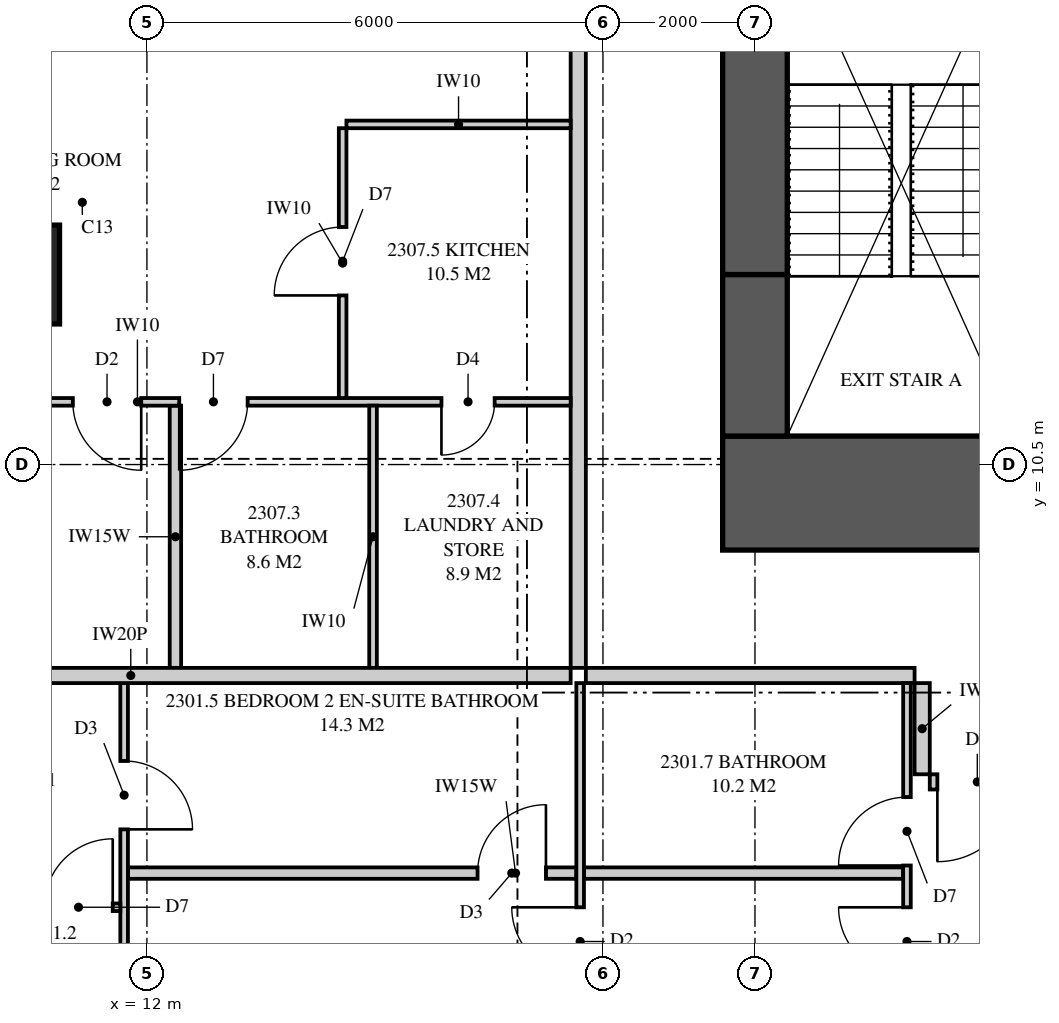
"""IFC4 building model, lengths in metres.
Left out: names, types, materials, properties, quantities, classifications, styles, units other than length and angle.
Written with IfcOpenShell. Run it as: python <this file> out.ifc"""

import sys

from ifc_helpers import new_model, si_unit, direction, frame, frame_2d, origin, origin_2d, place, context, subcontext, project, spatial, polyline, rectangle, outline, extrude, element, fill, save


model = new_model("IFC4")
c1 = context("Model", 3, precision=1e-05, world=origin(), true_north=direction((0.0, 1.0)))
c2 = subcontext(c1, "Body", "Model", "MODEL_VIEW")
j1 = project(units=[si_unit("LENGTHUNIT", "METRE"), si_unit("PLANEANGLEUNIT", "RADIAN")], contexts=[c1])
p1 = place(None, origin())
s1 = spatial("IfcSite", under=j1, at=p1, CompositionType="ELEMENT")
p2 = place(p1, origin())
s2 = spatial("IfcBuilding", under=s1, at=p2, CompositionType="ELEMENT")
p3 = place(p2, frame((0.0, 0.0, 88.1)))
s3 = spatial("IfcBuildingStorey", under=s2, at=p3, CompositionType="ELEMENT", Elevation=88.1)
p4 = place(p3, frame((10.2, 13.0, 0.0), z_axis=(0.0, 0.0, 1.0), x_axis=(1.0, 0.0, 0.0)))
e1 = element("IfcColumn", 1, at=p4, inside=s3, PredefinedType="COLUMN", context=c2, shape_type="SweptSolid", body=[
    extrude(rectangle(XDim=1.3, YDim=1.3, at=origin_2d()), origin(), (0.0, 0.0, 1.0), 3.35),
])
p5 = place(p3, frame((19.575, 10.125, 0.0), z_axis=(0.0, 0.0, 1.0), x_axis=(1.0, 0.0, 0.0)))
e2 = element("IfcWall", 2, at=p5, inside=s3, PredefinedType="SHEAR", context=c2, shape_type="SweptSolid", body=[
    extrude(rectangle(XDim=6.425, YDim=1.5, at=frame_2d((3.212, 0.0))), origin(), (0.0, 0.0, 1.0), 3.35),
])
p6 = place(p5, frame((4.85, 0.0, 0.0)))
e3 = element("IfcOpeningElement", 3, at=p6, cuts=e2, PredefinedType="OPENING", context=c2, shape_type="SweptSolid", body=[
    extrude(rectangle(XDim=0.75, YDim=2.1, at=frame_2d((0.375, 1.05))), frame((0.0, 0.76, 0.0), z_axis=(0.0, -1.0, 0.0), x_axis=(1.0, 0.0, 0.0)), (0.0, 0.0, 1.0), 1.52),
])
p7 = place(p3, frame((20.0, 17.7, 0.0), z_axis=(0.0, 0.0, 1.0), x_axis=(0.0, -1.0, 0.0)))
e4 = element("IfcWall", 4, at=p7, inside=s3, PredefinedType="SHEAR", context=c2, shape_type="SweptSolid", body=[
    extrude(rectangle(XDim=4.7, YDim=0.85, at=frame_2d((2.35, 0.0))), origin(), (0.0, 0.0, 1.0), 3.35),
])
p8 = place(p3, frame((20.0, 13.0, 0.0), z_axis=(0.0, 0.0, 1.0), x_axis=(0.0, -1.0, 0.0)))
e5 = element("IfcWall", 5, at=p8, inside=s3, PredefinedType="SHEAR", context=c2, shape_type="SweptSolid", body=[
    extrude(rectangle(XDim=2.125, YDim=0.85, at=frame_2d((1.062, 0.0))), origin(), (0.0, 0.0, 1.0), 3.35),
])
p9 = place(p3, frame((17.775, 7.725, 0.0), z_axis=(0.0, 0.0, 1.0), x_axis=(1.0, 0.0, 0.0)))
e6 = element("IfcWall", 6, at=p9, inside=s3, PredefinedType="PARTITIONING", context=c2, shape_type="SweptSolid", body=[
    extrude(rectangle(XDim=4.325, YDim=0.2, at=frame_2d((2.163, 0.0))), origin(), (0.0, 0.0, 1.0), 3.11),
])
p10 = place(p3, frame((11.7, 0.175, 0.0), z_axis=(0.0, 0.0, 1.0), x_axis=(0.0, 1.0, 0.0)))
e7 = element("IfcWall", 7, at=p10, inside=s3, PredefinedType="PARTITIONING", context=c2, shape_type="SweptSolid", body=[
    extrude(outline(polyline([(0.0, 0.0), (7.45, 0.0), (7.45, 3.11), (2.708, 3.11), (2.708, 2.15), (0.953, 2.15), (0.953, 3.11), (0.0, 3.11), (0.0, 0.0)])), frame((0.0, 0.05, 0.0), z_axis=(0.0, -1.0, 0.0), x_axis=(1.0, 0.0, 0.0)), (0.0, 0.0, 1.0), 0.1),
])
p11 = place(p10, frame((2.701, 0.0, 0.0)))
e8 = element("IfcOpeningElement", 8, at=p11, cuts=e7, PredefinedType="OPENING", context=c2, shape_type="SweptSolid", body=[
    extrude(rectangle(XDim=0.9, YDim=2.1, at=frame_2d((0.45, 1.05))), frame((0.0, 0.06, 0.0), z_axis=(0.0, -1.0, 0.0), x_axis=(1.0, 0.0, 0.0)), (0.0, 0.0, 1.0), 0.12),
])
p12 = place(p10, frame((5.525, 0.0, 0.0)))
e9 = element("IfcOpeningElement", 9, at=p12, cuts=e7, PredefinedType="OPENING", context=c2, shape_type="SweptSolid", body=[
    extrude(rectangle(XDim=0.9, YDim=2.1, at=frame_2d((0.45, 1.05))), frame((0.0, 0.06, 0.0), z_axis=(0.0, -1.0, 0.0), x_axis=(1.0, 0.0, 0.0)), (0.0, 0.0, 1.0), 0.12),
])
p13 = place(p3, frame((17.7, 0.175, 0.0), z_axis=(0.0, 0.0, 1.0), x_axis=(0.0, 1.0, 0.0)))
e10 = element("IfcWall", 10, at=p13, inside=s3, PredefinedType="PARTITIONING", context=c2, shape_type="SweptSolid", body=[
    extrude(outline(polyline([(1.635, 2.15), (0.0, 2.15), (0.0, 0.0), (7.45, 0.0), (7.45, 3.11), (1.635, 3.11), (1.635, 2.15)]), holes=[polyline([(1.024, 0.104), (0.526, 0.104), (0.526, 0.918), (1.024, 0.918), (1.024, 0.104)]), polyline([(1.024, 1.232), (0.526, 1.232), (0.526, 2.046), (1.024, 2.046), (1.024, 1.232)])]), frame((0.0, 0.05, 0.0), z_axis=(0.0, -1.0, 0.0), x_axis=(1.0, 0.0, 0.0)), (0.0, 0.0, 1.0), 0.1),
])
p14 = place(p13, frame((3.6, 0.0, 0.0)))
e11 = element("IfcOpeningElement", 11, at=p14, cuts=e10, PredefinedType="OPENING", context=c2, shape_type="SweptSolid", body=[
    extrude(rectangle(XDim=0.9, YDim=2.1, at=frame_2d((0.45, 1.05))), frame((0.0, 0.06, 0.0), z_axis=(0.0, -1.0, 0.0), x_axis=(1.0, 0.0, 0.0)), (0.0, 0.0, 1.0), 0.12),
])
p15 = place(p3, frame((22.0, 0.175, 0.0), z_axis=(0.0, 0.0, 1.0), x_axis=(0.0, 1.0, 0.0)))
e12 = element("IfcWall", 12, at=p15, inside=s3, PredefinedType="PARTITIONING", context=c2, shape_type="SweptSolid", body=[
    extrude(outline(polyline([(0.0, 0.0), (7.45, 0.0), (7.45, 3.11), (1.635, 3.11), (1.635, 2.15), (0.0, 2.15), (0.0, 3.11), (0.0, 0.0)])), frame((0.0, 0.05, 0.0), z_axis=(0.0, -1.0, 0.0), x_axis=(1.0, 0.0, 0.0)), (0.0, 0.0, 1.0), 0.1),
])
p16 = place(p15, frame((3.6, 0.0, 0.0)))
e13 = element("IfcOpeningElement", 13, at=p16, cuts=e12, PredefinedType="OPENING", context=c2, shape_type="SweptSolid", body=[
    extrude(rectangle(XDim=0.9, YDim=2.1, at=frame_2d((0.45, 1.05))), frame((0.0, 0.06, 0.0), z_axis=(0.0, -1.0, 0.0), x_axis=(1.0, 0.0, 0.0)), (0.0, 0.0, 1.0), 0.12),
])
p17 = place(p15, frame((5.05, 0.0, 0.0)))
e14 = element("IfcOpeningElement", 14, at=p17, cuts=e12, PredefinedType="OPENING", context=c2, shape_type="SweptSolid", body=[
    extrude(rectangle(XDim=0.9, YDim=2.1, at=frame_2d((0.45, 1.05))), frame((0.0, 0.06, 0.0), z_axis=(0.0, -1.0, 0.0), x_axis=(1.0, 0.0, 0.0)), (0.0, 0.0, 1.0), 0.12),
])
p18 = place(p3, frame((6.0, 4.676, 0.0), z_axis=(0.0, 0.0, 1.0), x_axis=(1.0, 0.0, 0.0)))
e15 = element("IfcWall", 15, at=p18, inside=s3, PredefinedType="PARTITIONING", context=c2, shape_type="SweptSolid", body=[
    extrude(outline(polyline([(0.0, 0.0), (5.65, 0.0), (5.65, 3.11), (5.46, 3.11), (5.46, 2.51), (3.171, 2.51), (3.171, 2.15), (1.429, 2.15), (1.429, 3.11), (0.0, 3.11), (0.0, 0.0)])), frame((0.0, 0.05, 0.0), z_axis=(0.0, -1.0, 0.0), x_axis=(1.0, 0.0, 0.0)), (0.0, 0.0, 1.0), 0.1),
])
p19 = place(p18, frame((4.65, 0.0, 0.0)))
e16 = element("IfcOpeningElement", 16, at=p19, cuts=e15, PredefinedType="OPENING", context=c2, shape_type="SweptSolid", body=[
    extrude(rectangle(XDim=0.9, YDim=2.1, at=frame_2d((0.45, 1.05))), frame((0.0, 0.06, 0.0), z_axis=(0.0, -1.0, 0.0), x_axis=(1.0, 0.0, 0.0)), (0.0, 0.0, 1.0), 0.12),
])
p20 = place(p3, frame((11.75, 5.125, 0.0), z_axis=(0.0, 0.0, 1.0), x_axis=(1.0, 0.0, 0.0)))
e17 = element("IfcWall", 17, at=p20, inside=s3, PredefinedType="PLUMBINGWALL", context=c2, shape_type="SweptSolid", body=[
    extrude(outline(polyline([(0.0, 0.0), (5.9, 0.0), (5.9, 3.11), (5.446, 3.11), (5.446, 2.531), (4.804, 2.531), (4.804, 3.11), (0.0, 3.11), (0.0, 0.0)])), frame((0.0, 0.075, 0.0), z_axis=(0.0, -1.0, 0.0), x_axis=(1.0, 0.0, 0.0)), (0.0, 0.0, 1.0), 0.15),
])
p21 = place(p20, frame((4.6, 0.0, 0.0)))
e18 = element("IfcOpeningElement", 18, at=p21, cuts=e17, PredefinedType="OPENING", context=c2, shape_type="SweptSolid", body=[
    extrude(rectangle(XDim=0.9, YDim=2.1, at=frame_2d((0.45, 1.05))), frame((0.0, 0.085, 0.0), z_axis=(0.0, -1.0, 0.0), x_axis=(1.0, 0.0, 0.0)), (0.0, 0.0, 1.0), 0.17),
])
p22 = place(p3, frame((17.75, 5.125, 0.0), z_axis=(0.0, 0.0, 1.0), x_axis=(1.0, 0.0, 0.0)))
e19 = element("IfcWall", 19, at=p22, inside=s3, PredefinedType="PLUMBINGWALL", context=c2, shape_type="SweptSolid", body=[
    extrude(rectangle(XDim=4.2, YDim=0.15, at=frame_2d((2.1, 0.0))), origin(), (0.0, 0.0, 1.0), 3.11),
])
p23 = place(p3, frame((6.0, 7.725, 0.0), z_axis=(0.0, 0.0, 1.0), x_axis=(1.0, 0.0, 0.0)))
e20 = element("IfcWall", 20, at=p23, inside=s3, PredefinedType="PARTITIONING", context=c2, shape_type="SweptSolid", body=[
    extrude(outline(polyline([(0.0, 0.0), (11.575, 0.0), (11.575, 3.11), (11.221, 3.11), (11.221, 2.531), (10.529, 2.531), (10.529, 3.11), (5.51, 3.11), (5.51, 2.51), (2.978, 2.51), (2.978, 2.531), (2.727, 2.531), (2.727, 2.15), (0.884, 2.15), (0.884, 3.11), (0.0, 3.11), (0.0, 0.0)])), frame((0.0, 0.1, 0.0), z_axis=(0.0, -1.0, 0.0), x_axis=(1.0, 0.0, 0.0)), (0.0, 0.0, 1.0), 0.2),
])
p24 = place(p3, frame((17.675, 7.825, 0.0), z_axis=(0.0, 0.0, 1.0), x_axis=(0.0, 1.0, 0.0)))
e21 = element("IfcWall", 21, at=p24, inside=s3, PredefinedType="PARTITIONING", context=c2, shape_type="SweptSolid", body=[
    extrude(outline(polyline([(0.0, 0.0), (9.075, 0.0), (9.075, 3.11), (3.096, 3.11), (3.096, 2.531), (2.404, 2.531), (2.404, 3.11), (0.0, 3.11), (0.0, 0.0)])), frame((0.0, 0.1, 0.0), z_axis=(0.0, -1.0, 0.0), x_axis=(1.0, 0.0, 0.0)), (0.0, 0.0, 1.0), 0.2),
])
p25 = place(p3, frame((6.175, 11.325, 0.0), z_axis=(0.0, 0.0, 1.0), x_axis=(1.0, 0.0, 0.0)))
e22 = element("IfcWall", 22, at=p25, inside=s3, PredefinedType="PARTITIONING", context=c2, shape_type="SweptSolid", body=[
    extrude(outline(polyline([(0.175, 3.11), (0.0, 3.11), (0.0, 0.0), (0.526, 0.0), (0.526, 0.337), (1.024, 0.337), (1.024, 0.0), (11.4, 0.0), (11.4, 3.11), (5.285, 3.11), (5.285, 2.51), (2.765, 2.51), (2.765, 3.11), (2.753, 3.11), (2.753, 2.531), (2.16, 2.531), (2.16, 3.11), (1.918, 3.11), (1.918, 2.15), (1.024, 2.15), (1.024, 1.813), (0.526, 1.813), (0.526, 2.15), (0.175, 2.15), (0.175, 3.11)])), frame((0.0, 0.05, 0.0), z_axis=(0.0, -1.0, 0.0), x_axis=(1.0, 0.0, 0.0)), (0.0, 0.0, 1.0), 0.1),
])
p26 = place(p25, frame((4.85, 0.0, 0.0)))
e23 = element("IfcOpeningElement", 23, at=p26, cuts=e22, PredefinedType="OPENING", context=c2, shape_type="SweptSolid", body=[
    extrude(rectangle(XDim=0.9, YDim=2.1, at=frame_2d((0.45, 1.05))), frame((0.0, 0.06, 0.0), z_axis=(0.0, -1.0, 0.0), x_axis=(1.0, 0.0, 0.0)), (0.0, 0.0, 1.0), 0.12),
])
p27 = place(p25, frame((6.25, 0.0, 0.0)))
e24 = element("IfcOpeningElement", 24, at=p27, cuts=e22, PredefinedType="OPENING", context=c2, shape_type="SweptSolid", body=[
    extrude(rectangle(XDim=0.9, YDim=2.1, at=frame_2d((0.45, 1.05))), frame((0.0, 0.06, 0.0), z_axis=(0.0, -1.0, 0.0), x_axis=(1.0, 0.0, 0.0)), (0.0, 0.0, 1.0), 0.12),
])
p28 = place(p25, frame((9.7, 0.0, 0.0)))
e25 = element("IfcOpeningElement", 25, at=p28, cuts=e22, PredefinedType="OPENING", context=c2, shape_type="SweptSolid", body=[
    extrude(rectangle(XDim=0.7, YDim=2.1, at=frame_2d((0.35, 1.05))), frame((0.0, 0.06, 0.0), z_axis=(0.0, -1.0, 0.0), x_axis=(1.0, 0.0, 0.0)), (0.0, 0.0, 1.0), 0.12),
])
p29 = place(p3, frame((12.375, 7.825, 0.0), z_axis=(0.0, 0.0, 1.0), x_axis=(0.0, 1.0, 0.0)))
e26 = element("IfcWall", 26, at=p29, inside=s3, PredefinedType="PLUMBINGWALL", context=c2, shape_type="SweptSolid", body=[
    extrude(outline(polyline([(0.0, 0.0), (3.45, 0.0), (3.45, 3.11), (3.071, 3.11), (3.071, 2.531), (2.429, 2.531), (2.429, 3.11), (0.0, 3.11), (0.0, 0.0)])), frame((0.0, 0.075, 0.0), z_axis=(0.0, -1.0, 0.0), x_axis=(1.0, 0.0, 0.0)), (0.0, 0.0, 1.0), 0.15),
])
p30 = place(p3, frame((14.975, 7.825, 0.0), z_axis=(0.0, 0.0, 1.0), x_axis=(0.0, 1.0, 0.0)))
e27 = element("IfcWall", 27, at=p30, inside=s3, PredefinedType="PARTITIONING", context=c2, shape_type="SweptSolid", body=[
    extrude(outline(polyline([(0.0, 0.0), (3.45, 0.0), (3.45, 3.11), (3.046, 3.11), (3.046, 2.531), (2.454, 2.531), (2.454, 3.11), (0.0, 3.11), (0.0, 0.0)])), frame((0.0, 0.05, 0.0), z_axis=(0.0, -1.0, 0.0), x_axis=(1.0, 0.0, 0.0)), (0.0, 0.0, 1.0), 0.1),
])
p31 = place(p3, frame((14.575, 11.375, 0.0), z_axis=(0.0, 0.0, 1.0), x_axis=(0.0, 1.0, 0.0)))
e28 = element("IfcWall", 28, at=p31, inside=s3, PredefinedType="PARTITIONING", context=c2, shape_type="SweptSolid", body=[
    extrude(rectangle(XDim=3.55, YDim=0.1, at=frame_2d((1.775, 0.0))), origin(), (0.0, 0.0, 1.0), 3.11),
])
p32 = place(p31, frame((1.35, 0.0, 0.0)))
e29 = element("IfcOpeningElement", 29, at=p32, cuts=e28, PredefinedType="OPENING", context=c2, shape_type="SweptSolid", body=[
    extrude(rectangle(XDim=0.9, YDim=2.1, at=frame_2d((0.45, 1.05))), frame((0.0, 0.06, 0.0), z_axis=(0.0, -1.0, 0.0), x_axis=(1.0, 0.0, 0.0)), (0.0, 0.0, 1.0), 0.12),
])
p33 = place(p3, frame((14.625, 14.975, 0.0), z_axis=(0.0, 0.0, 1.0), x_axis=(1.0, 0.0, 0.0)))
e30 = element("IfcWall", 30, at=p33, inside=s3, PredefinedType="PARTITIONING", context=c2, shape_type="SweptSolid", body=[
    extrude(rectangle(XDim=2.95, YDim=0.1, at=frame_2d((1.475, 0.0))), origin(), (0.0, 0.0, 1.0), 3.11),
])
p34 = place(p3, frame((22.3, 6.325, 0.0), z_axis=(0.0, 0.0, 1.0), x_axis=(1.0, 0.0, 0.0)))
e31 = element("IfcWall", 31, at=p34, inside=s3, PredefinedType="PARTITIONING", context=c2, shape_type="SweptSolid", body=[
    extrude(rectangle(XDim=2.4, YDim=0.2, at=frame_2d((1.2, 0.0))), origin(), (0.0, 0.0, 1.0), 3.11),
])
p35 = place(p34, frame((0.1, 0.0, 0.0)))
e32 = element("IfcOpeningElement", 32, at=p35, cuts=e31, PredefinedType="OPENING", context=c2, shape_type="SweptSolid", body=[
    extrude(rectangle(XDim=1.05, YDim=2.2, at=frame_2d((0.525, 1.1))), frame((0.0, 0.11, 0.0), z_axis=(0.0, -1.0, 0.0), x_axis=(1.0, 0.0, 0.0)), (0.0, 0.0, 1.0), 0.22),
])
p36 = place(p3, frame((22.2, 7.625, 0.0), z_axis=(0.0, 0.0, 1.0), x_axis=(0.0, -1.0, 0.0)))
e33 = element("IfcWall", 33, at=p36, inside=s3, PredefinedType="PARTITIONING", context=c2, shape_type="SweptSolid", body=[
    extrude(rectangle(XDim=1.2, YDim=0.2, at=frame_2d((0.6, 0.0))), origin(), (0.0, 0.0, 1.0), 3.11),
])
p37 = place(p35, frame((1.05, 0.0, 0.0), z_axis=(0.0, 0.0, 1.0), x_axis=(-1.0, 0.0, 0.0)))
e34 = element("IfcDoor", 34, at=p37, inside=s3, OperationType="SINGLE_SWING_RIGHT", PredefinedType="DOOR", context=c2, shape_type="SweptSolid", body=[
    extrude(rectangle(XDim=1.05, YDim=2.2, at=frame_2d((0.525, 1.1))), frame((0.0, 0.025, 0.0), z_axis=(0.0, -1.0, 0.0), x_axis=(1.0, 0.0, 0.0)), (0.0, 0.0, 1.0), 0.05),
])
fill(e32, e34)
p38 = place(p19, origin())
e35 = element("IfcDoor", 35, at=p38, inside=s3, OperationType="SINGLE_SWING_RIGHT", PredefinedType="DOOR", context=c2, shape_type="SweptSolid", body=[
    extrude(rectangle(XDim=0.9, YDim=2.1, at=frame_2d((0.45, 1.05))), frame((0.0, 0.025, 0.0), z_axis=(0.0, -1.0, 0.0), x_axis=(1.0, 0.0, 0.0)), (0.0, 0.0, 1.0), 0.05),
])
fill(e16, e35)
p39 = place(p14, origin())
e36 = element("IfcDoor", 36, at=p39, inside=s3, OperationType="SINGLE_SWING_RIGHT", PredefinedType="DOOR", context=c2, shape_type="SweptSolid", body=[
    extrude(rectangle(XDim=0.9, YDim=2.1, at=frame_2d((0.45, 1.05))), frame((0.0, 0.025, 0.0), z_axis=(0.0, -1.0, 0.0), x_axis=(1.0, 0.0, 0.0)), (0.0, 0.0, 1.0), 0.05),
])
fill(e11, e36)
p40 = place(p21, origin())
e37 = element("IfcDoor", 37, at=p40, inside=s3, OperationType="SINGLE_SWING_RIGHT", PredefinedType="DOOR", context=c2, shape_type="SweptSolid", body=[
    extrude(rectangle(XDim=0.9, YDim=2.1, at=frame_2d((0.45, 1.05))), frame((0.0, 0.025, 0.0), z_axis=(0.0, -1.0, 0.0), x_axis=(1.0, 0.0, 0.0)), (0.0, 0.0, 1.0), 0.05),
])
fill(e18, e37)
p41 = place(p16, origin())
e38 = element("IfcDoor", 38, at=p41, inside=s3, OperationType="SINGLE_SWING_RIGHT", PredefinedType="DOOR", context=c2, shape_type="SweptSolid", body=[
    extrude(rectangle(XDim=0.9, YDim=2.1, at=frame_2d((0.45, 1.05))), frame((0.0, 0.025, 0.0), z_axis=(0.0, -1.0, 0.0), x_axis=(1.0, 0.0, 0.0)), (0.0, 0.0, 1.0), 0.05),
])
fill(e13, e38)
p42 = place(p17, origin())
e39 = element("IfcDoor", 39, at=p42, inside=s3, OperationType="SINGLE_SWING_LEFT", PredefinedType="DOOR", context=c2, shape_type="SweptSolid", body=[
    extrude(rectangle(XDim=0.9, YDim=2.1, at=frame_2d((0.45, 1.05))), frame((0.0, 0.025, 0.0), z_axis=(0.0, -1.0, 0.0), x_axis=(1.0, 0.0, 0.0)), (0.0, 0.0, 1.0), 0.05),
])
fill(e14, e39)
p43 = place(p12, frame((0.9, 0.0, 0.0), z_axis=(0.0, 0.0, 1.0), x_axis=(-1.0, 0.0, 0.0)))
e40 = element("IfcDoor", 40, at=p43, inside=s3, OperationType="SINGLE_SWING_RIGHT", PredefinedType="DOOR", context=c2, shape_type="SweptSolid", body=[
    extrude(rectangle(XDim=0.9, YDim=2.1, at=frame_2d((0.45, 1.05))), frame((0.0, 0.025, 0.0), z_axis=(0.0, -1.0, 0.0), x_axis=(1.0, 0.0, 0.0)), (0.0, 0.0, 1.0), 0.05),
])
fill(e9, e40)
p44 = place(p26, frame((0.9, 0.0, 0.0), z_axis=(0.0, 0.0, 1.0), x_axis=(-1.0, 0.0, 0.0)))
e41 = element("IfcDoor", 41, at=p44, inside=s3, OperationType="SINGLE_SWING_LEFT", PredefinedType="DOOR", context=c2, shape_type="SweptSolid", body=[
    extrude(rectangle(XDim=0.9, YDim=2.1, at=frame_2d((0.45, 1.05))), frame((0.0, 0.025, 0.0), z_axis=(0.0, -1.0, 0.0), x_axis=(1.0, 0.0, 0.0)), (0.0, 0.0, 1.0), 0.05),
])
fill(e23, e41)
p45 = place(p27, frame((0.9, 0.0, 0.0), z_axis=(0.0, 0.0, 1.0), x_axis=(-1.0, 0.0, 0.0)))
e42 = element("IfcDoor", 42, at=p45, inside=s3, OperationType="SINGLE_SWING_RIGHT", PredefinedType="DOOR", context=c2, shape_type="SweptSolid", body=[
    extrude(rectangle(XDim=0.9, YDim=2.1, at=frame_2d((0.45, 1.05))), frame((0.0, 0.025, 0.0), z_axis=(0.0, -1.0, 0.0), x_axis=(1.0, 0.0, 0.0)), (0.0, 0.0, 1.0), 0.05),
])
fill(e24, e42)
p46 = place(p28, frame((0.7, 0.0, 0.0), z_axis=(0.0, 0.0, 1.0), x_axis=(-1.0, 0.0, 0.0)))
e43 = element("IfcDoor", 43, at=p46, inside=s3, OperationType="SINGLE_SWING_RIGHT", PredefinedType="DOOR", context=c2, shape_type="SweptSolid", body=[
    extrude(rectangle(XDim=0.7, YDim=2.1, at=frame_2d((0.35, 1.05))), frame((0.0, 0.025, 0.0), z_axis=(0.0, -1.0, 0.0), x_axis=(1.0, 0.0, 0.0)), (0.0, 0.0, 1.0), 0.05),
])
fill(e25, e43)
p47 = place(p32, origin())
e44 = element("IfcDoor", 44, at=p47, inside=s3, OperationType="SINGLE_SWING_LEFT", PredefinedType="DOOR", context=c2, shape_type="SweptSolid", body=[
    extrude(rectangle(XDim=0.9, YDim=2.1, at=frame_2d((0.45, 1.05))), frame((0.0, 0.025, 0.0), z_axis=(0.0, -1.0, 0.0), x_axis=(1.0, 0.0, 0.0)), (0.0, 0.0, 1.0), 0.05),
])
fill(e29, e44)
save(model, sys.argv[1])
